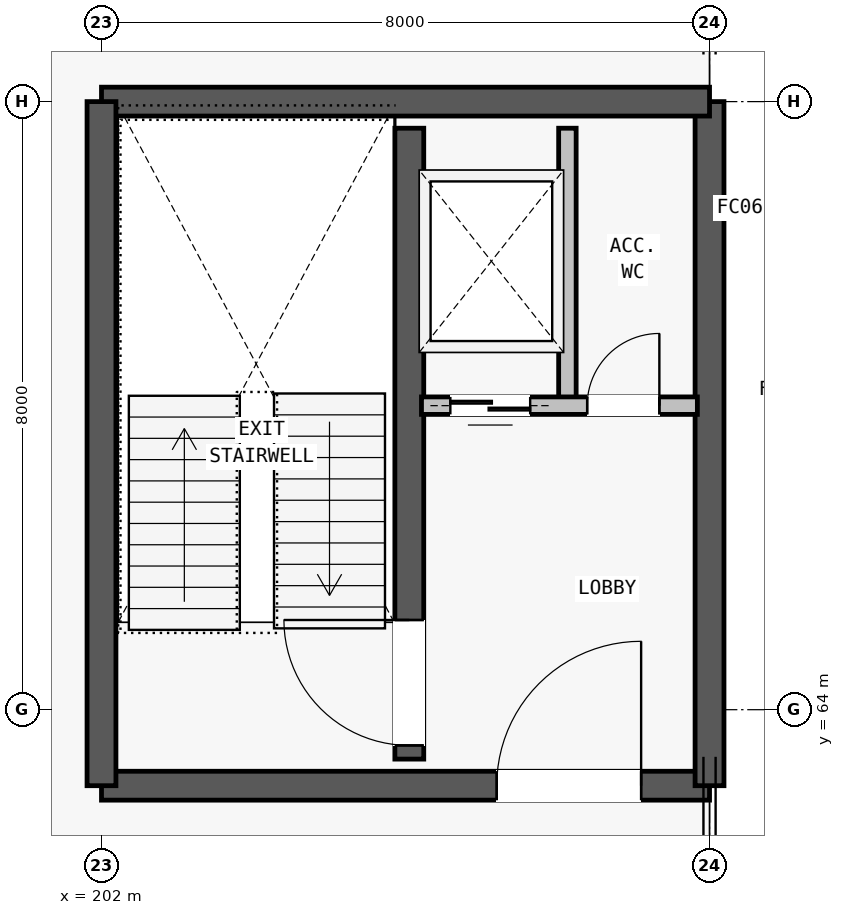
"""IFC4 building model, lengths in metres.
Left out: names, types, materials, properties, quantities, classifications, styles, units other than length and angle.
Written with IfcOpenShell. Run it as: python <this file> out.ifc"""

import sys

from ifc_helpers import new_model, si_unit, direction, frame, frame_2d, origin, place, context, subcontext, project, spatial, rectangle, extrude, element, fill, save


model = new_model("IFC4")
c1 = context("Model", 3, precision=1e-05, world=origin(), true_north=direction((0.0, 1.0)))
c2 = subcontext(c1, "Body", "Model", "MODEL_VIEW")
j1 = project(units=[si_unit("LENGTHUNIT", "METRE"), si_unit("PLANEANGLEUNIT", "RADIAN")], contexts=[c1])
p1 = place(None, origin())
s1 = spatial("IfcSite", under=j1, at=p1, CompositionType="ELEMENT")
p2 = place(p1, origin())
s2 = spatial("IfcBuilding", under=s1, at=p2, CompositionType="ELEMENT")
p3 = place(p2, frame((0.0, 0.0, 13.4)))
s3 = spatial("IfcBuildingStorey", under=s2, at=p3, CompositionType="ELEMENT", Elevation=13.4)
p4 = place(p3, frame((202.0, 63.0, 0.0), z_axis=(0.0, 0.0, 1.0), x_axis=(1.0, 0.0, 0.0)))
e1 = element("IfcWall", 1, at=p4, inside=s3, PredefinedType="SHEAR", context=c2, shape_type="SweptSolid", body=[
    extrude(rectangle(XDim=8.0, YDim=0.38, at=frame_2d((4.0, 0.0))), origin(), (0.0, 0.0, 1.0), 3.62),
])
p5 = place(p4, frame((5.2, 0.0, 0.0)))
e2 = element("IfcOpeningElement", 2, at=p5, cuts=e1, PredefinedType="OPENING", context=c2, shape_type="SweptSolid", body=[
    extrude(rectangle(XDim=1.9, YDim=2.3, at=frame_2d((0.95, 1.15))), frame((0.0, 0.2, 0.0), z_axis=(0.0, -1.0, 0.0), x_axis=(1.0, 0.0, 0.0)), (0.0, 0.0, 1.0), 0.4),
])
p6 = place(p3, frame((210.0, 63.0, 0.0), z_axis=(0.0, 0.0, 1.0), x_axis=(0.0, 1.0, 0.0)))
e3 = element("IfcWall", 3, at=p6, inside=s3, PredefinedType="SHEAR", context=c2, shape_type="SweptSolid", body=[
    extrude(rectangle(XDim=9.0, YDim=0.38, at=frame_2d((4.5, 0.0))), origin(), (0.0, 0.0, 1.0), 3.62),
])
p7 = place(p3, frame((210.0, 72.0, 0.0), z_axis=(0.0, 0.0, 1.0), x_axis=(-1.0, 0.0, 0.0)))
e4 = element("IfcWall", 4, at=p7, inside=s3, PredefinedType="SHEAR", context=c2, shape_type="SweptSolid", body=[
    extrude(rectangle(XDim=8.0, YDim=0.38, at=frame_2d((4.0, 0.0))), origin(), (0.0, 0.0, 1.0), 3.62),
])
p8 = place(p3, frame((202.0, 72.0, 0.0), z_axis=(0.0, 0.0, 1.0), x_axis=(0.0, -1.0, 0.0)))
e5 = element("IfcWall", 5, at=p8, inside=s3, PredefinedType="SHEAR", context=c2, shape_type="SweptSolid", body=[
    extrude(rectangle(XDim=9.0, YDim=0.38, at=frame_2d((4.5, 0.0))), origin(), (0.0, 0.0, 1.0), 3.62),
])
p9 = place(p3, frame((206.05, 63.35, 0.0), z_axis=(0.0, 0.0, 1.0), x_axis=(0.0, 1.0, 0.0)))
e6 = element("IfcWall", 6, at=p9, inside=s3, PredefinedType="SHEAR", context=c2, shape_type="SweptSolid", body=[
    extrude(rectangle(XDim=8.3, YDim=0.38, at=frame_2d((4.15, 0.0))), origin(), (0.0, 0.0, 1.0), 3.62),
])
p10 = place(p9, frame((0.18, 0.0, 0.0)))
e7 = element("IfcOpeningElement", 7, at=p10, cuts=e6, PredefinedType="OPENING", context=c2, shape_type="SweptSolid", body=[
    extrude(rectangle(XDim=1.65, YDim=2.2, at=frame_2d((0.825, 1.1))), frame((0.0, 0.2, 0.0), z_axis=(0.0, -1.0, 0.0), x_axis=(1.0, 0.0, 0.0)), (0.0, 0.0, 1.0), 0.4),
])
p11 = place(p3, frame((208.13, 68.0, 0.0), z_axis=(0.0, 0.0, 1.0), x_axis=(0.0, 1.0, 0.0)))
e8 = element("IfcWall", 8, at=p11, inside=s3, PredefinedType="PARTITIONING", context=c2, shape_type="SweptSolid", body=[
    extrude(rectangle(XDim=3.65, YDim=0.23, at=frame_2d((1.825, 0.0))), origin(), (0.0, 0.0, 1.0), 2.48),
])
p12 = place(p3, frame((206.21, 68.0, 0.0), z_axis=(0.0, 0.0, 1.0), x_axis=(1.0, 0.0, 0.0)))
e9 = element("IfcWall", 9, at=p12, inside=s3, PredefinedType="PARTITIONING", context=c2, shape_type="SweptSolid", body=[
    extrude(rectangle(XDim=3.63, YDim=0.23, at=frame_2d((1.815, 0.0))), origin(), (0.0, 0.0, 1.0), 2.48),
])
p13 = place(p12, frame((0.38, 0.0, 0.0)))
e10 = element("IfcOpeningElement", 10, at=p13, cuts=e9, PredefinedType="OPENING", context=c2, shape_type="SweptSolid", body=[
    extrude(rectangle(XDim=1.05, YDim=2.15, at=frame_2d((0.525, 1.075))), frame((0.0, 0.125, 0.0), z_axis=(0.0, -1.0, 0.0), x_axis=(1.0, 0.0, 0.0)), (0.0, 0.0, 1.0), 0.25),
])
p14 = place(p12, frame((2.18, 0.0, 0.0)))
e11 = element("IfcOpeningElement", 11, at=p14, cuts=e9, PredefinedType="OPENING", context=c2, shape_type="SweptSolid", body=[
    extrude(rectangle(XDim=0.95, YDim=2.1, at=frame_2d((0.475, 1.05))), frame((0.0, 0.125, 0.0), z_axis=(0.0, -1.0, 0.0), x_axis=(1.0, 0.0, 0.0)), (0.0, 0.0, 1.0), 0.25),
])
p15 = place(p5, origin())
e12 = element("IfcDoor", 12, at=p15, inside=s3, OperationType="SINGLE_SWING_RIGHT", PredefinedType="DOOR", context=c2, shape_type="SweptSolid", body=[
    extrude(rectangle(XDim=1.9, YDim=2.3, at=frame_2d((0.95, 1.15))), frame((0.0, 0.025, 0.0), z_axis=(0.0, -1.0, 0.0), x_axis=(1.0, 0.0, 0.0)), (0.0, 0.0, 1.0), 0.05),
])
fill(e2, e12)
p16 = place(p10, origin())
e13 = element("IfcDoor", 13, at=p16, inside=s3, OperationType="SINGLE_SWING_RIGHT", PredefinedType="DOOR", context=c2, shape_type="SweptSolid", body=[
    extrude(rectangle(XDim=1.65, YDim=2.2, at=frame_2d((0.825, 1.1))), frame((0.0, 0.025, 0.0), z_axis=(0.0, -1.0, 0.0), x_axis=(1.0, 0.0, 0.0)), (0.0, 0.0, 1.0), 0.05),
])
fill(e7, e13)
p17 = place(p13, origin())
e14 = element("IfcDoor", 14, at=p17, inside=s3, OperationType="SLIDING_TO_LEFT", PredefinedType="DOOR", context=c2, shape_type="SweptSolid", body=[
    extrude(rectangle(XDim=1.05, YDim=2.15, at=frame_2d((0.525, 1.075))), frame((0.0, 0.025, 0.0), z_axis=(0.0, -1.0, 0.0), x_axis=(1.0, 0.0, 0.0)), (0.0, 0.0, 1.0), 0.05),
])
fill(e10, e14)
p18 = place(p14, origin())
e15 = element("IfcDoor", 15, at=p18, inside=s3, OperationType="SINGLE_SWING_RIGHT", PredefinedType="DOOR", context=c2, shape_type="SweptSolid", body=[
    extrude(rectangle(XDim=0.95, YDim=2.1, at=frame_2d((0.475, 1.05))), frame((0.0, 0.025, 0.0), z_axis=(0.0, -1.0, 0.0), x_axis=(1.0, 0.0, 0.0)), (0.0, 0.0, 1.0), 0.05),
])
fill(e11, e15)
save(model, sys.argv[1])
